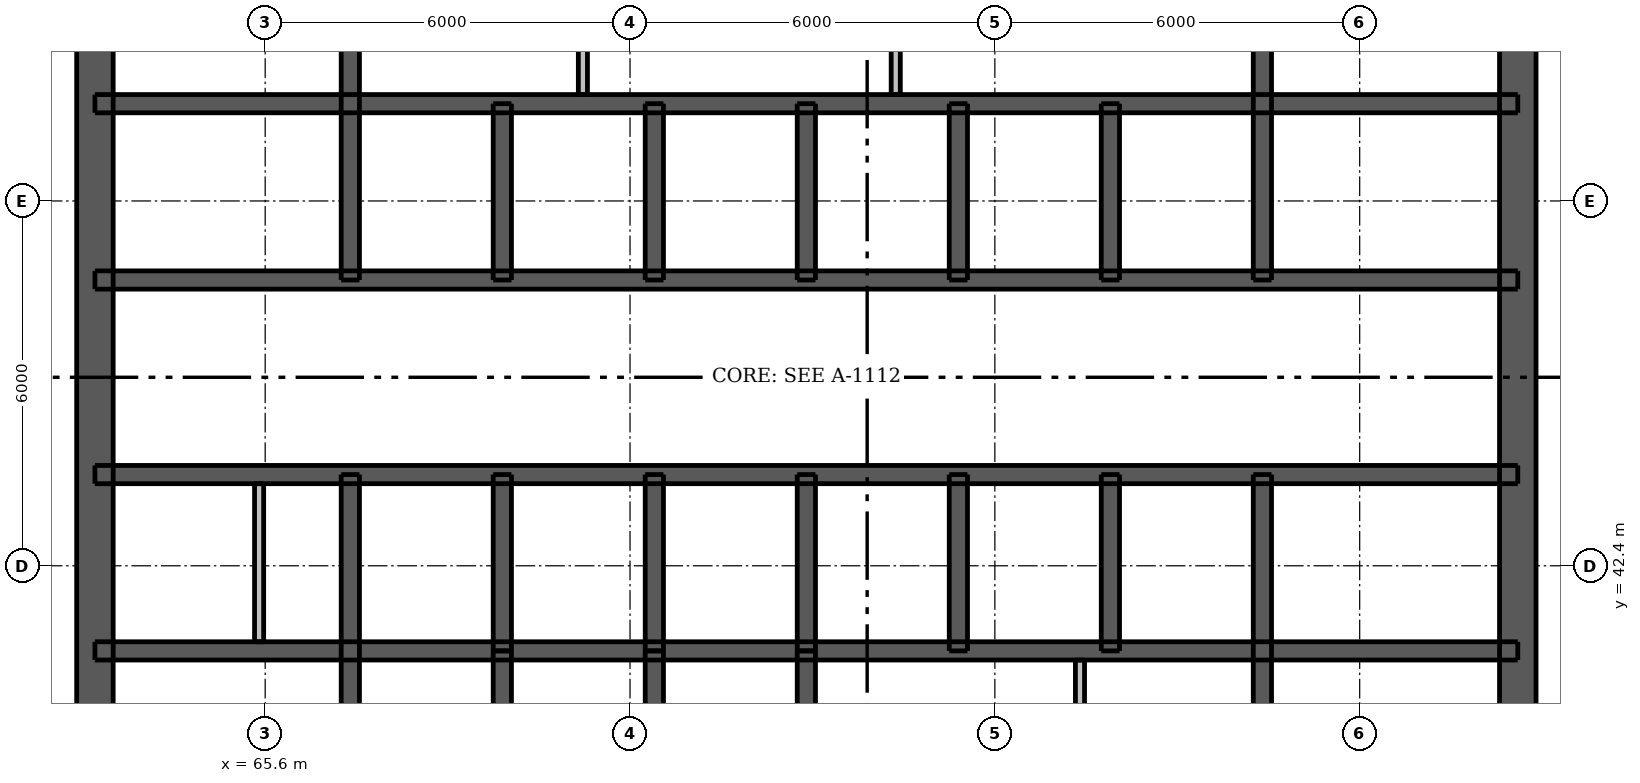
"""IFC4 building model, lengths in metres.
Left out: names, types, materials, properties, quantities, classifications, styles, units other than length and angle.
Written with IfcOpenShell. Run it as: python <this file> out.ifc"""

import sys

from ifc_helpers import new_model, si_unit, direction, frame, frame_2d, origin, place, context, subcontext, project, spatial, rectangle, extrude, element, fill, save


model = new_model("IFC4")
c1 = context("Model", 3, precision=1e-05, world=origin(), true_north=direction((0.0, 1.0)))
c2 = subcontext(c1, "Body", "Model", "MODEL_VIEW")
j1 = project(units=[si_unit("LENGTHUNIT", "METRE"), si_unit("PLANEANGLEUNIT", "RADIAN")], contexts=[c1])
p1 = place(None, origin())
s1 = spatial("IfcSite", under=j1, at=p1, CompositionType="ELEMENT")
p2 = place(p1, origin())
s2 = spatial("IfcBuilding", under=s1, at=p2, CompositionType="ELEMENT")
p3 = place(p2, frame((0.0, 0.0, 220.0)))
s3 = spatial("IfcBuildingStorey", under=s2, at=p3, CompositionType="ELEMENT", Elevation=220.0)
p4 = place(p3, frame((62.8, 33.5, 0.0), z_axis=(0.0, 0.0, 1.0), x_axis=(0.0, 1.0, 0.0)))
e1 = element("IfcWall", 1, at=p4, inside=s3, PredefinedType="SHEAR", context=c2, shape_type="SweptSolid", body=[
    extrude(rectangle(XDim=24.0, YDim=0.6, at=frame_2d((12.0, 0.0))), origin(), (0.0, 0.0, 1.0), 3.05),
])
p5 = place(p4, frame((11.2, 0.0, 0.0)))
e2 = element("IfcOpeningElement", 2, at=p5, cuts=e1, PredefinedType="OPENING", context=c2, shape_type="SweptSolid", body=[
    extrude(rectangle(XDim=1.6, YDim=2.1, at=frame_2d((0.8, 1.05))), frame((0.0, 0.31, 0.0), z_axis=(0.0, -1.0, 0.0), x_axis=(1.0, 0.0, 0.0)), (0.0, 0.0, 1.0), 0.62),
])
p6 = place(p3, frame((86.2, 33.5, 0.0), z_axis=(0.0, 0.0, 1.0), x_axis=(0.0, 1.0, 0.0)))
e3 = element("IfcWall", 3, at=p6, inside=s3, PredefinedType="SHEAR", context=c2, shape_type="SweptSolid", body=[
    extrude(rectangle(XDim=24.0, YDim=0.6, at=frame_2d((12.0, 0.0))), origin(), (0.0, 0.0, 1.0), 3.05),
])
p7 = place(p6, frame((11.2, 0.0, 0.0)))
e4 = element("IfcOpeningElement", 4, at=p7, cuts=e3, PredefinedType="OPENING", context=c2, shape_type="SweptSolid", body=[
    extrude(rectangle(XDim=1.6, YDim=2.1, at=frame_2d((0.8, 1.05))), frame((0.0, 0.31, 0.0), z_axis=(0.0, -1.0, 0.0), x_axis=(1.0, 0.0, 0.0)), (0.0, 0.0, 1.0), 0.62),
])
p8 = place(p3, frame((62.8, 41.0, 0.0), z_axis=(0.0, 0.0, 1.0), x_axis=(1.0, 0.0, 0.0)))
e5 = element("IfcWall", 5, at=p8, inside=s3, PredefinedType="SHEAR", context=c2, shape_type="SweptSolid", body=[
    extrude(rectangle(XDim=23.4, YDim=0.3, at=frame_2d((11.7, 0.0))), origin(), (0.0, 0.0, 1.0), 3.05),
])
p9 = place(p3, frame((62.8, 43.9, 0.0), z_axis=(0.0, 0.0, 1.0), x_axis=(1.0, 0.0, 0.0)))
e6 = element("IfcWall", 6, at=p9, inside=s3, PredefinedType="SHEAR", context=c2, shape_type="SweptSolid", body=[
    extrude(rectangle(XDim=23.4, YDim=0.3, at=frame_2d((11.7, 0.0))), origin(), (0.0, 0.0, 1.0), 3.05),
])
p10 = place(p9, frame((1.05, 0.0, 0.0)))
e7 = element("IfcOpeningElement", 7, at=p10, cuts=e6, PredefinedType="OPENING", context=c2, shape_type="SweptSolid", body=[
    extrude(rectangle(XDim=0.9, YDim=2.1, at=frame_2d((0.45, 1.05))), frame((0.0, 0.16, 0.0), z_axis=(0.0, -1.0, 0.0), x_axis=(1.0, 0.0, 0.0)), (0.0, 0.0, 1.0), 0.32),
])
p11 = place(p9, frame((2.975, 0.0, 0.0)))
e8 = element("IfcOpeningElement", 8, at=p11, cuts=e6, PredefinedType="OPENING", context=c2, shape_type="SweptSolid", body=[
    extrude(rectangle(XDim=0.8, YDim=2.1, at=frame_2d((0.4, 1.05))), frame((0.0, 0.16, 0.0), z_axis=(0.0, -1.0, 0.0), x_axis=(1.0, 0.0, 0.0)), (0.0, 0.0, 1.0), 0.32),
])
p12 = place(p9, frame((20.775, 0.0, 0.0)))
e9 = element("IfcOpeningElement", 9, at=p12, cuts=e6, PredefinedType="OPENING", context=c2, shape_type="SweptSolid", body=[
    extrude(rectangle(XDim=0.9, YDim=2.1, at=frame_2d((0.45, 1.05))), frame((0.0, 0.16, 0.0), z_axis=(0.0, -1.0, 0.0), x_axis=(1.0, 0.0, 0.0)), (0.0, 0.0, 1.0), 0.32),
])
p13 = place(p9, frame((7.5, 0.0, 0.0)))
e10 = element("IfcOpeningElement", 10, at=p13, cuts=e6, PredefinedType="OPENING", context=c2, shape_type="SweptSolid", body=[
    extrude(rectangle(XDim=0.9, YDim=2.1, at=frame_2d((0.45, 1.05))), frame((0.0, 0.16, 0.0), z_axis=(0.0, -1.0, 0.0), x_axis=(1.0, 0.0, 0.0)), (0.0, 0.0, 1.0), 0.32),
])
p14 = place(p9, frame((10.0, 0.0, 0.0)))
e11 = element("IfcOpeningElement", 11, at=p14, cuts=e6, PredefinedType="OPENING", context=c2, shape_type="SweptSolid", body=[
    extrude(rectangle(XDim=0.9, YDim=2.1, at=frame_2d((0.45, 1.05))), frame((0.0, 0.16, 0.0), z_axis=(0.0, -1.0, 0.0), x_axis=(1.0, 0.0, 0.0)), (0.0, 0.0, 1.0), 0.32),
])
p15 = place(p9, frame((15.0, 0.0, 0.0)))
e12 = element("IfcOpeningElement", 12, at=p15, cuts=e6, PredefinedType="OPENING", context=c2, shape_type="SweptSolid", body=[
    extrude(rectangle(XDim=0.9, YDim=2.1, at=frame_2d((0.45, 1.05))), frame((0.0, 0.16, 0.0), z_axis=(0.0, -1.0, 0.0), x_axis=(1.0, 0.0, 0.0)), (0.0, 0.0, 1.0), 0.32),
])
p16 = place(p9, frame((17.5, 0.0, 0.0)))
e13 = element("IfcOpeningElement", 13, at=p16, cuts=e6, PredefinedType="OPENING", context=c2, shape_type="SweptSolid", body=[
    extrude(rectangle(XDim=0.9, YDim=2.1, at=frame_2d((0.45, 1.05))), frame((0.0, 0.16, 0.0), z_axis=(0.0, -1.0, 0.0), x_axis=(1.0, 0.0, 0.0)), (0.0, 0.0, 1.0), 0.32),
])
p17 = place(p3, frame((62.8, 47.1, 0.0), z_axis=(0.0, 0.0, 1.0), x_axis=(1.0, 0.0, 0.0)))
e14 = element("IfcWall", 14, at=p17, inside=s3, PredefinedType="SHEAR", context=c2, shape_type="SweptSolid", body=[
    extrude(rectangle(XDim=23.4, YDim=0.3, at=frame_2d((11.7, 0.0))), origin(), (0.0, 0.0, 1.0), 3.05),
])
p18 = place(p17, frame((1.725, 0.0, 0.0)))
e15 = element("IfcOpeningElement", 15, at=p18, cuts=e14, PredefinedType="OPENING", context=c2, shape_type="SweptSolid", body=[
    extrude(rectangle(XDim=0.9, YDim=2.1, at=frame_2d((0.45, 1.05))), frame((0.0, 0.16, 0.0), z_axis=(0.0, -1.0, 0.0), x_axis=(1.0, 0.0, 0.0)), (0.0, 0.0, 1.0), 0.32),
])
p19 = place(p17, frame((20.775, 0.0, 0.0)))
e16 = element("IfcOpeningElement", 16, at=p19, cuts=e14, PredefinedType="OPENING", context=c2, shape_type="SweptSolid", body=[
    extrude(rectangle(XDim=0.9, YDim=2.1, at=frame_2d((0.45, 1.05))), frame((0.0, 0.16, 0.0), z_axis=(0.0, -1.0, 0.0), x_axis=(1.0, 0.0, 0.0)), (0.0, 0.0, 1.0), 0.32),
])
p20 = place(p17, frame((4.9, 0.0, 0.0)))
e17 = element("IfcOpeningElement", 17, at=p20, cuts=e14, PredefinedType="OPENING", context=c2, shape_type="SweptSolid", body=[
    extrude(rectangle(XDim=1.1, YDim=2.1, at=frame_2d((0.55, 1.05))), frame((0.0, 0.16, 0.0), z_axis=(0.0, -1.0, 0.0), x_axis=(1.0, 0.0, 0.0)), (0.0, 0.0, 1.0), 0.32),
])
p21 = place(p17, frame((7.4, 0.0, 0.0)))
e18 = element("IfcOpeningElement", 18, at=p21, cuts=e14, PredefinedType="OPENING", context=c2, shape_type="SweptSolid", body=[
    extrude(rectangle(XDim=1.1, YDim=2.1, at=frame_2d((0.55, 1.05))), frame((0.0, 0.16, 0.0), z_axis=(0.0, -1.0, 0.0), x_axis=(1.0, 0.0, 0.0)), (0.0, 0.0, 1.0), 0.32),
])
p22 = place(p17, frame((9.9, 0.0, 0.0)))
e19 = element("IfcOpeningElement", 19, at=p22, cuts=e14, PredefinedType="OPENING", context=c2, shape_type="SweptSolid", body=[
    extrude(rectangle(XDim=1.1, YDim=2.1, at=frame_2d((0.55, 1.05))), frame((0.0, 0.16, 0.0), z_axis=(0.0, -1.0, 0.0), x_axis=(1.0, 0.0, 0.0)), (0.0, 0.0, 1.0), 0.32),
])
p23 = place(p17, frame((12.4, 0.0, 0.0)))
e20 = element("IfcOpeningElement", 20, at=p23, cuts=e14, PredefinedType="OPENING", context=c2, shape_type="SweptSolid", body=[
    extrude(rectangle(XDim=1.1, YDim=2.1, at=frame_2d((0.55, 1.05))), frame((0.0, 0.16, 0.0), z_axis=(0.0, -1.0, 0.0), x_axis=(1.0, 0.0, 0.0)), (0.0, 0.0, 1.0), 0.32),
])
p24 = place(p17, frame((14.9, 0.0, 0.0)))
e21 = element("IfcOpeningElement", 21, at=p24, cuts=e14, PredefinedType="OPENING", context=c2, shape_type="SweptSolid", body=[
    extrude(rectangle(XDim=1.1, YDim=2.1, at=frame_2d((0.55, 1.05))), frame((0.0, 0.16, 0.0), z_axis=(0.0, -1.0, 0.0), x_axis=(1.0, 0.0, 0.0)), (0.0, 0.0, 1.0), 0.32),
])
p25 = place(p17, frame((17.4, 0.0, 0.0)))
e22 = element("IfcOpeningElement", 22, at=p25, cuts=e14, PredefinedType="OPENING", context=c2, shape_type="SweptSolid", body=[
    extrude(rectangle(XDim=1.1, YDim=2.1, at=frame_2d((0.55, 1.05))), frame((0.0, 0.16, 0.0), z_axis=(0.0, -1.0, 0.0), x_axis=(1.0, 0.0, 0.0)), (0.0, 0.0, 1.0), 0.32),
])
p26 = place(p3, frame((62.8, 50.0, 0.0), z_axis=(0.0, 0.0, 1.0), x_axis=(1.0, 0.0, 0.0)))
e23 = element("IfcWall", 23, at=p26, inside=s3, PredefinedType="SHEAR", context=c2, shape_type="SweptSolid", body=[
    extrude(rectangle(XDim=23.4, YDim=0.3, at=frame_2d((11.7, 0.0))), origin(), (0.0, 0.0, 1.0), 3.05),
])
p27 = place(p3, frame((67.0, 33.8, 0.0), z_axis=(0.0, 0.0, 1.0), x_axis=(0.0, 1.0, 0.0)))
e24 = element("IfcWall", 24, at=p27, inside=s3, PredefinedType="SHEAR", context=c2, shape_type="SweptSolid", body=[
    extrude(rectangle(XDim=10.1, YDim=0.3, at=frame_2d((5.05, 0.0))), origin(), (0.0, 0.0, 1.0), 3.05),
])
p28 = place(p27, frame((0.5, 0.0, 0.0)))
e25 = element("IfcOpeningElement", 25, at=p28, cuts=e24, PredefinedType="OPENING", context=c2, shape_type="SweptSolid", body=[
    extrude(rectangle(XDim=1.1, YDim=2.1, at=frame_2d((0.55, 1.05))), frame((0.0, 0.16, 0.0), z_axis=(0.0, -1.0, 0.0), x_axis=(1.0, 0.0, 0.0)), (0.0, 0.0, 1.0), 0.32),
])
for number, where, z_axis, x_axis in (
    (26, (67.0, 47.1, 0.0), (0.0, 0.0, 1.0), (0.0, 1.0, 0.0)),
    (27, (82.0, 33.8, 0.0), (0.0, 0.0, 1.0), (0.0, 1.0, 0.0)),
    (28, (82.0, 47.1, 0.0), (0.0, 0.0, 1.0), (0.0, 1.0, 0.0)),
):
    element("IfcWall", number, at=place(p3, frame(where, z_axis=z_axis, x_axis=x_axis)), inside=s3, PredefinedType="SHEAR", context=c2, shape_type="SweptSolid", body=[
        extrude(rectangle(XDim=10.1, YDim=0.3, at=frame_2d((5.05, 0.0))), origin(), (0.0, 0.0, 1.0), 3.05),
    ])
for number, where, z_axis, x_axis in (
    (29, (69.5, 41.0, 0.0), (0.0, 0.0, 1.0), (0.0, 1.0, 0.0)),
    (30, (69.5, 47.1, 0.0), (0.0, 0.0, 1.0), (0.0, 1.0, 0.0)),
    (31, (72.0, 41.0, 0.0), (0.0, 0.0, 1.0), (0.0, 1.0, 0.0)),
    (32, (72.0, 47.1, 0.0), (0.0, 0.0, 1.0), (0.0, 1.0, 0.0)),
    (33, (74.5, 41.0, 0.0), (0.0, 0.0, 1.0), (0.0, 1.0, 0.0)),
    (34, (74.5, 47.1, 0.0), (0.0, 0.0, 1.0), (0.0, 1.0, 0.0)),
    (35, (77.0, 41.0, 0.0), (0.0, 0.0, 1.0), (0.0, 1.0, 0.0)),
    (36, (77.0, 47.1, 0.0), (0.0, 0.0, 1.0), (0.0, 1.0, 0.0)),
    (37, (79.5, 41.0, 0.0), (0.0, 0.0, 1.0), (0.0, 1.0, 0.0)),
    (38, (79.5, 47.1, 0.0), (0.0, 0.0, 1.0), (0.0, 1.0, 0.0)),
    (39, (69.5, 38.1, 0.0), (0.0, 0.0, 1.0), (0.0, 1.0, 0.0)),
    (40, (72.0, 38.1, 0.0), (0.0, 0.0, 1.0), (0.0, 1.0, 0.0)),
    (41, (74.5, 38.1, 0.0), (0.0, 0.0, 1.0), (0.0, 1.0, 0.0)),
):
    element("IfcWall", number, at=place(p3, frame(where, z_axis=z_axis, x_axis=x_axis)), inside=s3, PredefinedType="SHEAR", context=c2, shape_type="SweptSolid", body=[
        extrude(rectangle(XDim=2.9, YDim=0.3, at=frame_2d((1.45, 0.0))), origin(), (0.0, 0.0, 1.0), 3.05),
    ])
p29 = place(p3, frame((79.0, 34.1, 0.0), z_axis=(0.0, 0.0, 1.0), x_axis=(0.0, 1.0, 0.0)))
e42 = element("IfcWall", 42, at=p29, inside=s3, PredefinedType="PLUMBINGWALL", context=c2, shape_type="SweptSolid", body=[
    extrude(rectangle(XDim=6.75, YDim=0.15, at=frame_2d((3.375, 0.0))), origin(), (0.0, 0.0, 1.0), 3.05),
])
p30 = place(p3, frame((65.5, 41.15, 0.0), z_axis=(0.0, 0.0, 1.0), x_axis=(0.0, 1.0, 0.0)))
e43 = element("IfcWall", 43, at=p30, inside=s3, PredefinedType="PLUMBINGWALL", context=c2, shape_type="SweptSolid", body=[
    extrude(rectangle(XDim=2.6, YDim=0.15, at=frame_2d((1.3, 0.0))), origin(), (0.0, 0.0, 1.0), 3.05),
])
for number, where, z_axis, x_axis in (
    (44, (70.825, 50.15, 0.0), (0.0, 0.0, 1.0), (0.0, 1.0, 0.0)),
    (45, (75.97, 50.15, 0.0), (0.0, 0.0, 1.0), (0.0, 1.0, 0.0)),
):
    element("IfcWall", number, at=place(p3, frame(where, z_axis=z_axis, x_axis=x_axis)), inside=s3, PredefinedType="PLUMBINGWALL", context=c2, shape_type="SweptSolid", body=[
        extrude(rectangle(XDim=6.75, YDim=0.15, at=frame_2d((3.375, 0.0))), origin(), (0.0, 0.0, 1.0), 3.05),
    ])
p31 = place(p5, origin())
e46 = element("IfcDoor", 46, at=p31, inside=s3, OperationType="DOUBLE_DOOR_SINGLE_SWING", PredefinedType="DOOR", context=c2, shape_type="SweptSolid", body=[
    extrude(rectangle(XDim=1.6, YDim=2.1, at=frame_2d((0.8, 1.05))), frame((0.0, -0.237, 0.0), z_axis=(0.0, -1.0, 0.0), x_axis=(1.0, 0.0, 0.0)), (0.0, 0.0, 1.0), 0.05),
])
fill(e2, e46)
p32 = place(p7, origin())
e47 = element("IfcDoor", 47, at=p32, inside=s3, OperationType="DOUBLE_DOOR_SINGLE_SWING", PredefinedType="DOOR", context=c2, shape_type="SweptSolid", body=[
    extrude(rectangle(XDim=1.6, YDim=2.1, at=frame_2d((0.8, 1.05))), frame((0.0, 0.288, 0.0), z_axis=(0.0, -1.0, 0.0), x_axis=(1.0, 0.0, 0.0)), (0.0, 0.0, 1.0), 0.05),
])
fill(e4, e47)
p33 = place(p10, origin())
e48 = element("IfcDoor", 48, at=p33, inside=s3, OperationType="SINGLE_SWING_LEFT", PredefinedType="DOOR", context=c2, shape_type="SweptSolid", body=[
    extrude(rectangle(XDim=0.9, YDim=2.1, at=frame_2d((0.45, 1.05))), frame((0.0, -0.087, 0.0), z_axis=(0.0, -1.0, 0.0), x_axis=(1.0, 0.0, 0.0)), (0.0, 0.0, 1.0), 0.05),
])
fill(e7, e48)
p34 = place(p11, origin())
e49 = element("IfcDoor", 49, at=p34, inside=s3, OperationType="SINGLE_SWING_RIGHT", PredefinedType="DOOR", context=c2, shape_type="SweptSolid", body=[
    extrude(rectangle(XDim=0.8, YDim=2.1, at=frame_2d((0.4, 1.05))), frame((0.0, -0.087, 0.0), z_axis=(0.0, -1.0, 0.0), x_axis=(1.0, 0.0, 0.0)), (0.0, 0.0, 1.0), 0.05),
])
fill(e8, e49)
p35 = place(p12, origin())
e50 = element("IfcDoor", 50, at=p35, inside=s3, OperationType="SINGLE_SWING_LEFT", PredefinedType="DOOR", context=c2, shape_type="SweptSolid", body=[
    extrude(rectangle(XDim=0.9, YDim=2.1, at=frame_2d((0.45, 1.05))), frame((0.0, -0.087, 0.0), z_axis=(0.0, -1.0, 0.0), x_axis=(1.0, 0.0, 0.0)), (0.0, 0.0, 1.0), 0.05),
])
fill(e9, e50)
p36 = place(p18, origin())
e51 = element("IfcDoor", 51, at=p36, inside=s3, OperationType="SINGLE_SWING_LEFT", PredefinedType="DOOR", context=c2, shape_type="SweptSolid", body=[
    extrude(rectangle(XDim=0.9, YDim=2.1, at=frame_2d((0.45, 1.05))), frame((0.0, 0.138, 0.0), z_axis=(0.0, -1.0, 0.0), x_axis=(1.0, 0.0, 0.0)), (0.0, 0.0, 1.0), 0.05),
])
fill(e15, e51)
p37 = place(p19, origin())
e52 = element("IfcDoor", 52, at=p37, inside=s3, OperationType="SINGLE_SWING_LEFT", PredefinedType="DOOR", context=c2, shape_type="SweptSolid", body=[
    extrude(rectangle(XDim=0.9, YDim=2.1, at=frame_2d((0.45, 1.05))), frame((0.0, 0.138, 0.0), z_axis=(0.0, -1.0, 0.0), x_axis=(1.0, 0.0, 0.0)), (0.0, 0.0, 1.0), 0.05),
])
fill(e16, e52)
p38 = place(p13, origin())
e53 = element("IfcDoor", 53, at=p38, inside=s3, OperationType="SINGLE_SWING_LEFT", PredefinedType="DOOR", context=c2, shape_type="SweptSolid", body=[
    extrude(rectangle(XDim=0.9, YDim=2.1, at=frame_2d((0.45, 1.05))), frame((0.0, -0.087, 0.0), z_axis=(0.0, -1.0, 0.0), x_axis=(1.0, 0.0, 0.0)), (0.0, 0.0, 1.0), 0.05),
])
fill(e10, e53)
p39 = place(p14, origin())
e54 = element("IfcDoor", 54, at=p39, inside=s3, OperationType="SINGLE_SWING_RIGHT", PredefinedType="DOOR", context=c2, shape_type="SweptSolid", body=[
    extrude(rectangle(XDim=0.9, YDim=2.1, at=frame_2d((0.45, 1.05))), frame((0.0, -0.087, 0.0), z_axis=(0.0, -1.0, 0.0), x_axis=(1.0, 0.0, 0.0)), (0.0, 0.0, 1.0), 0.05),
])
fill(e11, e54)
p40 = place(p15, origin())
e55 = element("IfcDoor", 55, at=p40, inside=s3, OperationType="SINGLE_SWING_RIGHT", PredefinedType="DOOR", context=c2, shape_type="SweptSolid", body=[
    extrude(rectangle(XDim=0.9, YDim=2.1, at=frame_2d((0.45, 1.05))), frame((0.0, -0.087, 0.0), z_axis=(0.0, -1.0, 0.0), x_axis=(1.0, 0.0, 0.0)), (0.0, 0.0, 1.0), 0.05),
])
fill(e12, e55)
p41 = place(p16, origin())
e56 = element("IfcDoor", 56, at=p41, inside=s3, OperationType="SINGLE_SWING_LEFT", PredefinedType="DOOR", context=c2, shape_type="SweptSolid", body=[
    extrude(rectangle(XDim=0.9, YDim=2.1, at=frame_2d((0.45, 1.05))), frame((0.0, -0.087, 0.0), z_axis=(0.0, -1.0, 0.0), x_axis=(1.0, 0.0, 0.0)), (0.0, 0.0, 1.0), 0.05),
])
fill(e13, e56)
p42 = place(p20, origin())
e57 = element("IfcDoor", 57, at=p42, inside=s3, OperationType="DOUBLE_DOOR_SLIDING", PredefinedType="DOOR", context=c2, shape_type="SweptSolid", body=[
    extrude(rectangle(XDim=1.1, YDim=2.1, at=frame_2d((0.55, 1.05))), frame((0.0, 0.025, 0.0), z_axis=(0.0, -1.0, 0.0), x_axis=(1.0, 0.0, 0.0)), (0.0, 0.0, 1.0), 0.05),
])
fill(e17, e57)
p43 = place(p21, origin())
e58 = element("IfcDoor", 58, at=p43, inside=s3, OperationType="DOUBLE_DOOR_SLIDING", PredefinedType="DOOR", context=c2, shape_type="SweptSolid", body=[
    extrude(rectangle(XDim=1.1, YDim=2.1, at=frame_2d((0.55, 1.05))), frame((0.0, 0.025, 0.0), z_axis=(0.0, -1.0, 0.0), x_axis=(1.0, 0.0, 0.0)), (0.0, 0.0, 1.0), 0.05),
])
fill(e18, e58)
p44 = place(p22, origin())
e59 = element("IfcDoor", 59, at=p44, inside=s3, OperationType="DOUBLE_DOOR_SLIDING", PredefinedType="DOOR", context=c2, shape_type="SweptSolid", body=[
    extrude(rectangle(XDim=1.1, YDim=2.1, at=frame_2d((0.55, 1.05))), frame((0.0, 0.025, 0.0), z_axis=(0.0, -1.0, 0.0), x_axis=(1.0, 0.0, 0.0)), (0.0, 0.0, 1.0), 0.05),
])
fill(e19, e59)
p45 = place(p23, origin())
e60 = element("IfcDoor", 60, at=p45, inside=s3, OperationType="DOUBLE_DOOR_SLIDING", PredefinedType="DOOR", context=c2, shape_type="SweptSolid", body=[
    extrude(rectangle(XDim=1.1, YDim=2.1, at=frame_2d((0.55, 1.05))), frame((0.0, 0.025, 0.0), z_axis=(0.0, -1.0, 0.0), x_axis=(1.0, 0.0, 0.0)), (0.0, 0.0, 1.0), 0.05),
])
fill(e20, e60)
p46 = place(p24, origin())
e61 = element("IfcDoor", 61, at=p46, inside=s3, OperationType="DOUBLE_DOOR_SLIDING", PredefinedType="DOOR", context=c2, shape_type="SweptSolid", body=[
    extrude(rectangle(XDim=1.1, YDim=2.1, at=frame_2d((0.55, 1.05))), frame((0.0, 0.025, 0.0), z_axis=(0.0, -1.0, 0.0), x_axis=(1.0, 0.0, 0.0)), (0.0, 0.0, 1.0), 0.05),
])
fill(e21, e61)
p47 = place(p25, origin())
e62 = element("IfcDoor", 62, at=p47, inside=s3, OperationType="DOUBLE_DOOR_SLIDING", PredefinedType="DOOR", context=c2, shape_type="SweptSolid", body=[
    extrude(rectangle(XDim=1.1, YDim=2.1, at=frame_2d((0.55, 1.05))), frame((0.0, 0.025, 0.0), z_axis=(0.0, -1.0, 0.0), x_axis=(1.0, 0.0, 0.0)), (0.0, 0.0, 1.0), 0.05),
])
fill(e22, e62)
save(model, sys.argv[1])
